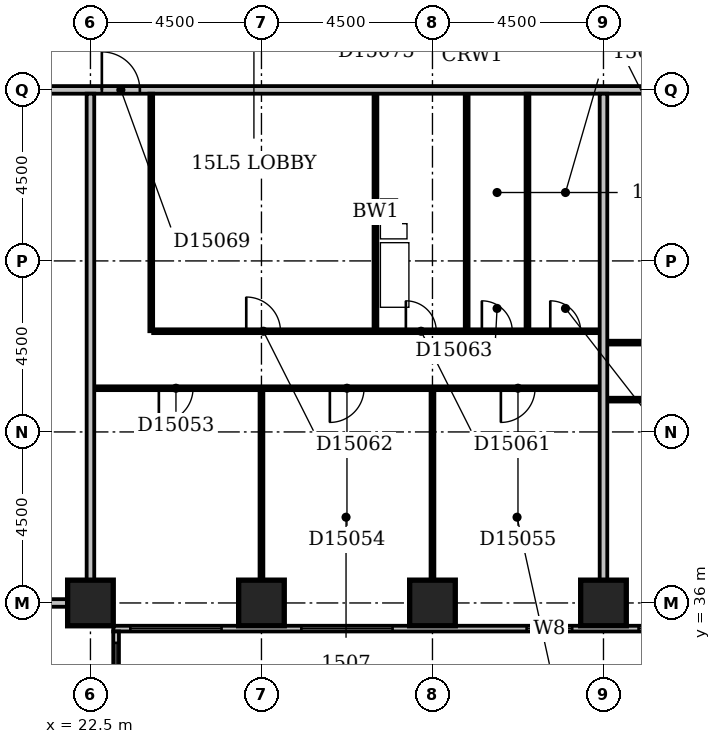
"""IFC4 building model, lengths in metres.
Left out: names, types, materials, properties, quantities, classifications, styles, units other than length and angle.
Written with IfcOpenShell. Run it as: python <this file> out.ifc"""

import sys

from ifc_helpers import new_model, si_unit, direction, frame, frame_2d, origin, origin_2d, place, context, subcontext, project, spatial, rectangle, extrude, element, fill, save


model = new_model("IFC4")
c1 = context("Model", 3, precision=1e-05, world=origin(), true_north=direction((0.0, 1.0)))
c2 = subcontext(c1, "Body", "Model", "MODEL_VIEW")
j1 = project(units=[si_unit("LENGTHUNIT", "METRE"), si_unit("PLANEANGLEUNIT", "RADIAN")], contexts=[c1])
p1 = place(None, origin())
s1 = spatial("IfcSite", under=j1, at=p1, CompositionType="ELEMENT")
p2 = place(p1, origin())
s2 = spatial("IfcBuilding", under=s1, at=p2, CompositionType="ELEMENT")
p3 = place(p2, frame((0.0, 0.0, 65.0)))
s3 = spatial("IfcBuildingStorey", under=s2, at=p3, CompositionType="ELEMENT", Elevation=65.0)
for number, where, z_axis, x_axis in (
    (1, (22.5, 36.0, -0.3), (0.0, 0.0, 1.0), (1.0, 0.0, 0.0)),
    (2, (27.0, 36.0, -0.3), (0.0, 0.0, 1.0), (1.0, 0.0, 0.0)),
    (3, (31.5, 36.0, -0.3), (0.0, 0.0, 1.0), (1.0, 0.0, 0.0)),
    (4, (36.0, 36.0, -0.3), (0.0, 0.0, 1.0), (1.0, 0.0, 0.0)),
):
    element("IfcColumn", number, at=place(p3, frame(where, z_axis=z_axis, x_axis=x_axis)), inside=s3, PredefinedType="COLUMN", context=c2, shape_type="SweptSolid", body=[
        extrude(rectangle(XDim=1.2, YDim=1.2, at=origin_2d()), origin(), (0.0, 0.0, 1.0), 3.6),
    ])
p4 = place(p3, frame((23.175, 17.4, 0.0), z_axis=(0.0, 0.0, 1.0), x_axis=(0.0, 1.0, 0.0)))
e5 = element("IfcWall", 5, at=p4, inside=s3, PredefinedType="STANDARD", context=c2, shape_type="SweptSolid", body=[
    extrude(rectangle(XDim=17.85, YDim=0.15, at=frame_2d((8.925, 0.0))), origin(), (0.0, 0.0, 1.0), 2.7),
])
p5 = place(p4, frame((1.65, 0.0, 0.6)))
e6 = element("IfcOpeningElement", 6, at=p5, cuts=e5, PredefinedType="OPENING", context=c2, shape_type="SweptSolid", body=[
    extrude(rectangle(XDim=2.4, YDim=1.8, at=frame_2d((1.2, 0.9))), frame((0.0, 0.087, 0.0), z_axis=(0.0, -1.0, 0.0), x_axis=(1.0, 0.0, 0.0)), (0.0, 0.0, 1.0), 0.174),
])
p6 = place(p4, frame((6.15, 0.0, 0.6)))
e7 = element("IfcOpeningElement", 7, at=p6, cuts=e5, PredefinedType="OPENING", context=c2, shape_type="SweptSolid", body=[
    extrude(rectangle(XDim=2.4, YDim=1.8, at=frame_2d((1.2, 0.9))), frame((0.0, 0.087, 0.0), z_axis=(0.0, -1.0, 0.0), x_axis=(1.0, 0.0, 0.0)), (0.0, 0.0, 1.0), 0.174),
])
p7 = place(p4, frame((10.479, 0.0, 0.6)))
e8 = element("IfcOpeningElement", 8, at=p7, cuts=e5, PredefinedType="OPENING", context=c2, shape_type="SweptSolid", body=[
    extrude(rectangle(XDim=1.8, YDim=1.8, at=frame_2d((0.9, 0.9))), frame((0.0, 0.087, 0.0), z_axis=(0.0, -1.0, 0.0), x_axis=(1.0, 0.0, 0.0)), (0.0, 0.0, 1.0), 0.174),
])
p8 = place(p4, frame((15.15, 0.0, 0.6)))
e9 = element("IfcOpeningElement", 9, at=p8, cuts=e5, PredefinedType="OPENING", context=c2, shape_type="SweptSolid", body=[
    extrude(rectangle(XDim=2.4, YDim=1.8, at=frame_2d((1.2, 0.9))), frame((0.0, 0.087, 0.0), z_axis=(0.0, -1.0, 0.0), x_axis=(1.0, 0.0, 0.0)), (0.0, 0.0, 1.0), 0.174),
])
p9 = place(p3, frame((23.1, 35.325, 0.0), z_axis=(0.0, 0.0, 1.0), x_axis=(1.0, 0.0, 0.0)))
e10 = element("IfcWall", 10, at=p9, inside=s3, PredefinedType="STANDARD", context=c2, shape_type="SweptSolid", body=[
    extrude(rectangle(XDim=45.15, YDim=0.15, at=frame_2d((22.575, 0.0))), origin(), (0.0, 0.0, 1.0), 2.7),
])
p10 = place(p9, frame((0.45, 0.0, 0.6)))
e11 = element("IfcOpeningElement", 11, at=p10, cuts=e10, PredefinedType="OPENING", context=c2, shape_type="SweptSolid", body=[
    extrude(rectangle(XDim=2.4, YDim=1.8, at=frame_2d((1.2, 0.9))), frame((0.0, 0.087, 0.0), z_axis=(0.0, -1.0, 0.0), x_axis=(1.0, 0.0, 0.0)), (0.0, 0.0, 1.0), 0.174),
])
p11 = place(p9, frame((4.95, 0.0, 0.6)))
e12 = element("IfcOpeningElement", 12, at=p11, cuts=e10, PredefinedType="OPENING", context=c2, shape_type="SweptSolid", body=[
    extrude(rectangle(XDim=2.4, YDim=1.8, at=frame_2d((1.2, 0.9))), frame((0.0, 0.087, 0.0), z_axis=(0.0, -1.0, 0.0), x_axis=(1.0, 0.0, 0.0)), (0.0, 0.0, 1.0), 0.174),
])
p12 = place(p9, frame((10.877, 0.0, 0.6)))
e13 = element("IfcOpeningElement", 13, at=p12, cuts=e10, PredefinedType="OPENING", context=c2, shape_type="SweptSolid", body=[
    extrude(rectangle(XDim=1.2, YDim=1.8, at=frame_2d((0.6, 0.9))), frame((0.0, 0.087, 0.0), z_axis=(0.0, -1.0, 0.0), x_axis=(1.0, 0.0, 0.0)), (0.0, 0.0, 1.0), 0.174),
])
p13 = place(p9, frame((13.823, 0.0, 0.6)))
e14 = element("IfcOpeningElement", 14, at=p13, cuts=e10, PredefinedType="OPENING", context=c2, shape_type="SweptSolid", body=[
    extrude(rectangle(XDim=1.2, YDim=1.8, at=frame_2d((0.6, 0.9))), frame((0.0, 0.087, 0.0), z_axis=(0.0, -1.0, 0.0), x_axis=(1.0, 0.0, 0.0)), (0.0, 0.0, 1.0), 0.174),
])
p14 = place(p9, frame((18.45, 0.0, 0.6)))
e15 = element("IfcOpeningElement", 15, at=p14, cuts=e10, PredefinedType="OPENING", context=c2, shape_type="SweptSolid", body=[
    extrude(rectangle(XDim=2.4, YDim=1.8, at=frame_2d((1.2, 0.9))), frame((0.0, 0.087, 0.0), z_axis=(0.0, -1.0, 0.0), x_axis=(1.0, 0.0, 0.0)), (0.0, 0.0, 1.0), 0.174),
])
p15 = place(p9, frame((22.95, 0.0, 0.6)))
e16 = element("IfcOpeningElement", 16, at=p15, cuts=e10, PredefinedType="OPENING", context=c2, shape_type="SweptSolid", body=[
    extrude(rectangle(XDim=2.4, YDim=1.8, at=frame_2d((1.2, 0.9))), frame((0.0, 0.087, 0.0), z_axis=(0.0, -1.0, 0.0), x_axis=(1.0, 0.0, 0.0)), (0.0, 0.0, 1.0), 0.174),
])
p16 = place(p9, frame((27.45, 0.0, 0.6)))
e17 = element("IfcOpeningElement", 17, at=p16, cuts=e10, PredefinedType="OPENING", context=c2, shape_type="SweptSolid", body=[
    extrude(rectangle(XDim=2.4, YDim=1.8, at=frame_2d((1.2, 0.9))), frame((0.0, 0.087, 0.0), z_axis=(0.0, -1.0, 0.0), x_axis=(1.0, 0.0, 0.0)), (0.0, 0.0, 1.0), 0.174),
])
p17 = place(p9, frame((31.95, 0.0, 0.6)))
e18 = element("IfcOpeningElement", 18, at=p17, cuts=e10, PredefinedType="OPENING", context=c2, shape_type="SweptSolid", body=[
    extrude(rectangle(XDim=2.4, YDim=1.8, at=frame_2d((1.2, 0.9))), frame((0.0, 0.087, 0.0), z_axis=(0.0, -1.0, 0.0), x_axis=(1.0, 0.0, 0.0)), (0.0, 0.0, 1.0), 0.174),
])
p18 = place(p9, frame((36.45, 0.0, 0.6)))
e19 = element("IfcOpeningElement", 19, at=p18, cuts=e10, PredefinedType="OPENING", context=c2, shape_type="SweptSolid", body=[
    extrude(rectangle(XDim=2.4, YDim=1.8, at=frame_2d((1.2, 0.9))), frame((0.0, 0.087, 0.0), z_axis=(0.0, -1.0, 0.0), x_axis=(1.0, 0.0, 0.0)), (0.0, 0.0, 1.0), 0.174),
])
p19 = place(p9, frame((41.403, 0.0, 0.6)))
e20 = element("IfcOpeningElement", 20, at=p19, cuts=e10, PredefinedType="OPENING", context=c2, shape_type="SweptSolid", body=[
    extrude(rectangle(XDim=2.1, YDim=1.8, at=frame_2d((1.05, 0.9))), frame((0.0, 0.087, 0.0), z_axis=(0.0, -1.0, 0.0), x_axis=(1.0, 0.0, 0.0)), (0.0, 0.0, 1.0), 0.174),
])
p20 = place(p3, frame((9.1, 36.0, 0.0), z_axis=(0.0, 0.0, 1.0), x_axis=(1.0, 0.0, 0.0)))
e21 = element("IfcWall", 21, at=p20, inside=s3, PredefinedType="PARTITIONING", context=c2, shape_type="SweptSolid", body=[
    extrude(rectangle(XDim=12.8, YDim=0.2, at=frame_2d((6.4, 0.0))), origin(), (0.0, 0.0, 1.0), 2.4),
])
p21 = place(p3, frame((22.5, 36.6, 0.0), z_axis=(0.0, 0.0, 1.0), x_axis=(0.0, 1.0, 0.0)))
e22 = element("IfcWall", 22, at=p21, inside=s3, PredefinedType="PARTITIONING", context=c2, shape_type="SweptSolid", body=[
    extrude(rectangle(XDim=12.8, YDim=0.2, at=frame_2d((6.4, 0.0))), origin(), (0.0, 0.0, 1.0), 3.3),
])
p22 = place(p3, frame((27.0, 36.6, 0.0), z_axis=(0.0, 0.0, 1.0), x_axis=(0.0, 1.0, 0.0)))
e23 = element("IfcWall", 23, at=p22, inside=s3, PredefinedType="PARTITIONING", context=c2, shape_type="SweptSolid", body=[
    extrude(rectangle(XDim=5.0, YDim=0.1, at=frame_2d((2.5, 0.0))), origin(), (0.0, 0.0, 1.0), 2.6),
])
p23 = place(p3, frame((31.5, 36.6, 0.0), z_axis=(0.0, 0.0, 1.0), x_axis=(0.0, 1.0, 0.0)))
e24 = element("IfcWall", 24, at=p23, inside=s3, PredefinedType="PARTITIONING", context=c2, shape_type="SweptSolid", body=[
    extrude(rectangle(XDim=5.0, YDim=0.1, at=frame_2d((2.5, 0.0))), origin(), (0.0, 0.0, 1.0), 3.3),
])
p24 = place(p3, frame((36.0, 36.6, 0.0), z_axis=(0.0, 0.0, 1.0), x_axis=(0.0, 1.0, 0.0)))
e25 = element("IfcWall", 25, at=p24, inside=s3, PredefinedType="PARTITIONING", context=c2, shape_type="SweptSolid", body=[
    extrude(rectangle(XDim=12.8, YDim=0.2, at=frame_2d((6.4, 0.0))), origin(), (0.0, 0.0, 1.0), 2.4),
])
p25 = place(p3, frame((36.1, 41.35, 0.0), z_axis=(0.0, 0.0, 1.0), x_axis=(1.0, 0.0, 0.0)))
e26 = element("IfcWall", 26, at=p25, inside=s3, PredefinedType="PARTITIONING", context=c2, shape_type="SweptSolid", body=[
    extrude(rectangle(XDim=8.8, YDim=0.1, at=frame_2d((4.4, 0.0))), origin(), (0.0, 0.0, 1.0), 3.3),
])
p26 = place(p25, frame((1.7, 0.0, 0.0)))
e27 = element("IfcOpeningElement", 27, at=p26, cuts=e26, PredefinedType="OPENING", context=c2, shape_type="SweptSolid", body=[
    extrude(rectangle(XDim=0.9, YDim=2.1, at=frame_2d((0.45, 1.05))), frame((0.0, 0.062, 0.0), z_axis=(0.0, -1.0, 0.0), x_axis=(1.0, 0.0, 0.0)), (0.0, 0.0, 1.0), 0.124),
])
p27 = place(p25, frame((5.05, 0.0, 0.0)))
e28 = element("IfcOpeningElement", 28, at=p27, cuts=e26, PredefinedType="OPENING", context=c2, shape_type="SweptSolid", body=[
    extrude(rectangle(XDim=0.9, YDim=2.1, at=frame_2d((0.45, 1.05))), frame((0.0, 0.062, 0.0), z_axis=(0.0, -1.0, 0.0), x_axis=(1.0, 0.0, 0.0)), (0.0, 0.0, 1.0), 0.124),
])
p28 = place(p3, frame((22.6, 41.65, 0.0), z_axis=(0.0, 0.0, 1.0), x_axis=(1.0, 0.0, 0.0)))
e29 = element("IfcWall", 29, at=p28, inside=s3, PredefinedType="PARTITIONING", context=c2, shape_type="SweptSolid", body=[
    extrude(rectangle(XDim=13.3, YDim=0.1, at=frame_2d((6.65, 0.0))), origin(), (0.0, 0.0, 1.0), 3.3),
])
p29 = place(p28, frame((1.7, 0.0, 0.0)))
e30 = element("IfcOpeningElement", 30, at=p29, cuts=e29, PredefinedType="OPENING", context=c2, shape_type="SweptSolid", body=[
    extrude(rectangle(XDim=0.9, YDim=2.1, at=frame_2d((0.45, 1.05))), frame((0.0, 0.062, 0.0), z_axis=(0.0, -1.0, 0.0), x_axis=(1.0, 0.0, 0.0)), (0.0, 0.0, 1.0), 0.124),
])
p30 = place(p28, frame((6.2, 0.0, 0.0)))
e31 = element("IfcOpeningElement", 31, at=p30, cuts=e29, PredefinedType="OPENING", context=c2, shape_type="SweptSolid", body=[
    extrude(rectangle(XDim=0.9, YDim=2.1, at=frame_2d((0.45, 1.05))), frame((0.0, 0.062, 0.0), z_axis=(0.0, -1.0, 0.0), x_axis=(1.0, 0.0, 0.0)), (0.0, 0.0, 1.0), 0.124),
])
p31 = place(p28, frame((10.7, 0.0, 0.0)))
e32 = element("IfcOpeningElement", 32, at=p31, cuts=e29, PredefinedType="OPENING", context=c2, shape_type="SweptSolid", body=[
    extrude(rectangle(XDim=0.9, YDim=2.1, at=frame_2d((0.45, 1.05))), frame((0.0, 0.062, 0.0), z_axis=(0.0, -1.0, 0.0), x_axis=(1.0, 0.0, 0.0)), (0.0, 0.0, 1.0), 0.124),
])
p32 = place(p3, frame((36.1, 42.85, 0.0), z_axis=(0.0, 0.0, 1.0), x_axis=(1.0, 0.0, 0.0)))
e33 = element("IfcWall", 33, at=p32, inside=s3, PredefinedType="PARTITIONING", context=c2, shape_type="SweptSolid", body=[
    extrude(rectangle(XDim=4.85, YDim=0.1, at=frame_2d((2.425, 0.0))), origin(), (0.0, 0.0, 1.0), 3.3),
])
p33 = place(p32, frame((1.95, 0.0, 0.0)))
e34 = element("IfcOpeningElement", 34, at=p33, cuts=e33, PredefinedType="OPENING", context=c2, shape_type="SweptSolid", body=[
    extrude(rectangle(XDim=0.9, YDim=2.1, at=frame_2d((0.45, 1.05))), frame((0.0, 0.062, 0.0), z_axis=(0.0, -1.0, 0.0), x_axis=(1.0, 0.0, 0.0)), (0.0, 0.0, 1.0), 0.124),
])
p34 = place(p3, frame((24.1, 43.15, 0.0), z_axis=(0.0, 0.0, 1.0), x_axis=(0.0, 1.0, 0.0)))
e35 = element("IfcWall", 35, at=p34, inside=s3, PredefinedType="PARTITIONING", context=c2, shape_type="SweptSolid", body=[
    extrude(rectangle(XDim=6.25, YDim=0.1, at=frame_2d((3.125, 0.0))), origin(), (0.0, 0.0, 1.0), 3.3),
])
p35 = place(p3, frame((24.15, 43.15, 0.0), z_axis=(0.0, 0.0, 1.0), x_axis=(1.0, 0.0, 0.0)))
e36 = element("IfcWall", 36, at=p35, inside=s3, PredefinedType="PARTITIONING", context=c2, shape_type="SweptSolid", body=[
    extrude(rectangle(XDim=11.75, YDim=0.1, at=frame_2d((5.875, 0.0))), origin(), (0.0, 0.0, 1.0), 3.3),
])
p36 = place(p35, frame((6.65, 0.0, 0.0)))
e37 = element("IfcOpeningElement", 37, at=p36, cuts=e36, PredefinedType="OPENING", context=c2, shape_type="SweptSolid", body=[
    extrude(rectangle(XDim=0.8, YDim=2.1, at=frame_2d((0.4, 1.05))), frame((0.0, 0.062, 0.0), z_axis=(0.0, -1.0, 0.0), x_axis=(1.0, 0.0, 0.0)), (0.0, 0.0, 1.0), 0.124),
])
p37 = place(p35, frame((2.45, 0.0, 0.0)))
e38 = element("IfcOpeningElement", 38, at=p37, cuts=e36, PredefinedType="OPENING", context=c2, shape_type="SweptSolid", body=[
    extrude(rectangle(XDim=0.9, YDim=2.1, at=frame_2d((0.45, 1.05))), frame((0.0, 0.062, 0.0), z_axis=(0.0, -1.0, 0.0), x_axis=(1.0, 0.0, 0.0)), (0.0, 0.0, 1.0), 0.124),
])
p38 = place(p35, frame((8.65, 0.0, 0.0)))
e39 = element("IfcOpeningElement", 39, at=p38, cuts=e36, PredefinedType="OPENING", context=c2, shape_type="SweptSolid", body=[
    extrude(rectangle(XDim=0.8, YDim=2.1, at=frame_2d((0.4, 1.05))), frame((0.0, 0.062, 0.0), z_axis=(0.0, -1.0, 0.0), x_axis=(1.0, 0.0, 0.0)), (0.0, 0.0, 1.0), 0.124),
])
p39 = place(p35, frame((10.45, 0.0, 0.0)))
e40 = element("IfcOpeningElement", 40, at=p39, cuts=e36, PredefinedType="OPENING", context=c2, shape_type="SweptSolid", body=[
    extrude(rectangle(XDim=0.8, YDim=2.1, at=frame_2d((0.4, 1.05))), frame((0.0, 0.062, 0.0), z_axis=(0.0, -1.0, 0.0), x_axis=(1.0, 0.0, 0.0)), (0.0, 0.0, 1.0), 0.124),
])
for number, where, z_axis, x_axis in (
    (41, (30.0, 43.2, 0.0), (0.0, 0.0, 1.0), (0.0, 1.0, 0.0)),
    (42, (32.4, 43.2, 0.0), (0.0, 0.0, 1.0), (0.0, 1.0, 0.0)),
):
    element("IfcWall", number, at=place(p3, frame(where, z_axis=z_axis, x_axis=x_axis)), inside=s3, PredefinedType="PLUMBINGWALL", context=c2, shape_type="SweptSolid", body=[
        extrude(rectangle(XDim=6.2, YDim=0.1, at=frame_2d((3.1, 0.0))), origin(), (0.0, 0.0, 1.0), 3.3),
    ])
p40 = place(p3, frame((34.0, 43.2, 0.0), z_axis=(0.0, 0.0, 1.0), x_axis=(0.0, 1.0, 0.0)))
e43 = element("IfcWall", 43, at=p40, inside=s3, PredefinedType="PARTITIONING", context=c2, shape_type="SweptSolid", body=[
    extrude(rectangle(XDim=6.2, YDim=0.1, at=frame_2d((3.1, 0.0))), origin(), (0.0, 0.0, 1.0), 3.3),
])
p41 = place(p3, frame((9.1, 49.5, 0.0), z_axis=(0.0, 0.0, 1.0), x_axis=(1.0, 0.0, 0.0)))
e44 = element("IfcWall", 44, at=p41, inside=s3, PredefinedType="PARTITIONING", context=c2, shape_type="SweptSolid", body=[
    extrude(rectangle(XDim=57.8, YDim=0.2, at=frame_2d((28.9, 0.0))), origin(), (0.0, 0.0, 1.0), 3.3),
])
p42 = place(p41, frame((13.7, 0.0, 0.0)))
e45 = element("IfcOpeningElement", 45, at=p42, cuts=e44, PredefinedType="OPENING", context=c2, shape_type="SweptSolid", body=[
    extrude(rectangle(XDim=1.0, YDim=2.1, at=frame_2d((0.5, 1.05))), frame((0.0, 0.112, 0.0), z_axis=(0.0, -1.0, 0.0), x_axis=(1.0, 0.0, 0.0)), (0.0, 0.0, 1.0), 0.224),
])
p43 = place(p41, frame((32.2, 0.0, 0.0)))
e46 = element("IfcOpeningElement", 46, at=p43, cuts=e44, PredefinedType="OPENING", context=c2, shape_type="SweptSolid", body=[
    extrude(rectangle(XDim=1.0, YDim=2.1, at=frame_2d((0.5, 1.05))), frame((0.0, 0.112, 0.0), z_axis=(0.0, -1.0, 0.0), x_axis=(1.0, 0.0, 0.0)), (0.0, 0.0, 1.0), 0.224),
])
p44 = place(p41, frame((37.85, 0.0, 0.0)))
e47 = element("IfcOpeningElement", 47, at=p44, cuts=e44, PredefinedType="OPENING", context=c2, shape_type="SweptSolid", body=[
    extrude(rectangle(XDim=1.0, YDim=2.1, at=frame_2d((0.5, 1.05))), frame((0.0, 0.112, 0.0), z_axis=(0.0, -1.0, 0.0), x_axis=(1.0, 0.0, 0.0)), (0.0, 0.0, 1.0), 0.224),
])
p45 = place(p41, frame((45.7, 0.0, 0.0)))
e48 = element("IfcOpeningElement", 48, at=p45, cuts=e44, PredefinedType="OPENING", context=c2, shape_type="SweptSolid", body=[
    extrude(rectangle(XDim=1.0, YDim=2.1, at=frame_2d((0.5, 1.05))), frame((0.0, 0.112, 0.0), z_axis=(0.0, -1.0, 0.0), x_axis=(1.0, 0.0, 0.0)), (0.0, 0.0, 1.0), 0.224),
])
p46 = place(p41, frame((49.7, 0.0, 0.0)))
e49 = element("IfcOpeningElement", 49, at=p46, cuts=e44, PredefinedType="OPENING", context=c2, shape_type="SweptSolid", body=[
    extrude(rectangle(XDim=1.0, YDim=2.1, at=frame_2d((0.5, 1.05))), frame((0.0, 0.112, 0.0), z_axis=(0.0, -1.0, 0.0), x_axis=(1.0, 0.0, 0.0)), (0.0, 0.0, 1.0), 0.224),
])
p47 = place(p41, frame((8.4, 0.0, 0.0)))
e50 = element("IfcOpeningElement", 50, at=p47, cuts=e44, PredefinedType="OPENING", context=c2, shape_type="SweptSolid", body=[
    extrude(rectangle(XDim=0.9, YDim=2.1, at=frame_2d((0.45, 1.05))), frame((0.0, 0.112, 0.0), z_axis=(0.0, -1.0, 0.0), x_axis=(1.0, 0.0, 0.0)), (0.0, 0.0, 1.0), 0.224),
])
p48 = place(p8, origin())
e51 = element("IfcWindow", 51, at=p48, inside=s3, PartitioningType="SINGLE_PANEL", PredefinedType="WINDOW", context=c2, shape_type="SweptSolid", body=[
    extrude(rectangle(XDim=2.4, YDim=1.8, at=frame_2d((1.2, 0.9))), frame((0.0, 0.03, 0.0), z_axis=(0.0, -1.0, 0.0), x_axis=(1.0, 0.0, 0.0)), (0.0, 0.0, 1.0), 0.06),
])
fill(e9, e51)
p49 = place(p10, origin())
e52 = element("IfcWindow", 52, at=p49, inside=s3, PartitioningType="SINGLE_PANEL", PredefinedType="WINDOW", context=c2, shape_type="SweptSolid", body=[
    extrude(rectangle(XDim=2.4, YDim=1.8, at=frame_2d((1.2, 0.9))), frame((0.0, 0.03, 0.0), z_axis=(0.0, -1.0, 0.0), x_axis=(1.0, 0.0, 0.0)), (0.0, 0.0, 1.0), 0.06),
])
fill(e11, e52)
p50 = place(p11, origin())
e53 = element("IfcWindow", 53, at=p50, inside=s3, PartitioningType="SINGLE_PANEL", PredefinedType="WINDOW", context=c2, shape_type="SweptSolid", body=[
    extrude(rectangle(XDim=2.4, YDim=1.8, at=frame_2d((1.2, 0.9))), frame((0.0, 0.03, 0.0), z_axis=(0.0, -1.0, 0.0), x_axis=(1.0, 0.0, 0.0)), (0.0, 0.0, 1.0), 0.06),
])
fill(e12, e53)
p51 = place(p12, origin())
e54 = element("IfcWindow", 54, at=p51, inside=s3, PartitioningType="SINGLE_PANEL", PredefinedType="WINDOW", context=c2, shape_type="SweptSolid", body=[
    extrude(rectangle(XDim=1.2, YDim=1.8, at=frame_2d((0.6, 0.9))), frame((0.0, 0.03, 0.0), z_axis=(0.0, -1.0, 0.0), x_axis=(1.0, 0.0, 0.0)), (0.0, 0.0, 1.0), 0.06),
])
fill(e13, e54)
p52 = place(p13, origin())
e55 = element("IfcWindow", 55, at=p52, inside=s3, PartitioningType="SINGLE_PANEL", PredefinedType="WINDOW", context=c2, shape_type="SweptSolid", body=[
    extrude(rectangle(XDim=1.2, YDim=1.8, at=frame_2d((0.6, 0.9))), frame((0.0, 0.03, 0.0), z_axis=(0.0, -1.0, 0.0), x_axis=(1.0, 0.0, 0.0)), (0.0, 0.0, 1.0), 0.06),
])
fill(e14, e55)
p53 = place(p29, frame((0.9, 0.0, 0.0), z_axis=(0.0, 0.0, 1.0), x_axis=(-1.0, 0.0, 0.0)))
e56 = element("IfcDoor", 56, at=p53, inside=s3, OperationType="SINGLE_SWING_RIGHT", PredefinedType="DOOR", context=c2, shape_type="SweptSolid", body=[
    extrude(rectangle(XDim=0.9, YDim=2.1, at=frame_2d((0.45, 1.05))), frame((0.0, 0.025, 0.0), z_axis=(0.0, -1.0, 0.0), x_axis=(1.0, 0.0, 0.0)), (0.0, 0.0, 1.0), 0.05),
])
fill(e30, e56)
p54 = place(p30, frame((0.9, 0.0, 0.0), z_axis=(0.0, 0.0, 1.0), x_axis=(-1.0, 0.0, 0.0)))
e57 = element("IfcDoor", 57, at=p54, inside=s3, OperationType="SINGLE_SWING_RIGHT", PredefinedType="DOOR", context=c2, shape_type="SweptSolid", body=[
    extrude(rectangle(XDim=0.9, YDim=2.1, at=frame_2d((0.45, 1.05))), frame((0.0, 0.025, 0.0), z_axis=(0.0, -1.0, 0.0), x_axis=(1.0, 0.0, 0.0)), (0.0, 0.0, 1.0), 0.05),
])
fill(e31, e57)
p55 = place(p31, frame((0.9, 0.0, 0.0), z_axis=(0.0, 0.0, 1.0), x_axis=(-1.0, 0.0, 0.0)))
e58 = element("IfcDoor", 58, at=p55, inside=s3, OperationType="SINGLE_SWING_RIGHT", PredefinedType="DOOR", context=c2, shape_type="SweptSolid", body=[
    extrude(rectangle(XDim=0.9, YDim=2.1, at=frame_2d((0.45, 1.05))), frame((0.0, 0.025, 0.0), z_axis=(0.0, -1.0, 0.0), x_axis=(1.0, 0.0, 0.0)), (0.0, 0.0, 1.0), 0.05),
])
fill(e32, e58)
p56 = place(p36, origin())
e59 = element("IfcDoor", 59, at=p56, inside=s3, OperationType="SINGLE_SWING_LEFT", PredefinedType="DOOR", context=c2, shape_type="SweptSolid", body=[
    extrude(rectangle(XDim=0.8, YDim=2.1, at=frame_2d((0.4, 1.05))), frame((0.0, 0.025, 0.0), z_axis=(0.0, -1.0, 0.0), x_axis=(1.0, 0.0, 0.0)), (0.0, 0.0, 1.0), 0.05),
])
fill(e37, e59)
p57 = place(p37, origin())
e60 = element("IfcDoor", 60, at=p57, inside=s3, OperationType="SINGLE_SWING_LEFT", PredefinedType="DOOR", context=c2, shape_type="SweptSolid", body=[
    extrude(rectangle(XDim=0.9, YDim=2.1, at=frame_2d((0.45, 1.05))), frame((0.0, 0.025, 0.0), z_axis=(0.0, -1.0, 0.0), x_axis=(1.0, 0.0, 0.0)), (0.0, 0.0, 1.0), 0.05),
])
fill(e38, e60)
p58 = place(p38, origin())
e61 = element("IfcDoor", 61, at=p58, inside=s3, OperationType="SINGLE_SWING_LEFT", PredefinedType="DOOR", context=c2, shape_type="SweptSolid", body=[
    extrude(rectangle(XDim=0.8, YDim=2.1, at=frame_2d((0.4, 1.05))), frame((0.0, 0.025, 0.0), z_axis=(0.0, -1.0, 0.0), x_axis=(1.0, 0.0, 0.0)), (0.0, 0.0, 1.0), 0.05),
])
fill(e39, e61)
p59 = place(p39, origin())
e62 = element("IfcDoor", 62, at=p59, inside=s3, OperationType="SINGLE_SWING_LEFT", PredefinedType="DOOR", context=c2, shape_type="SweptSolid", body=[
    extrude(rectangle(XDim=0.8, YDim=2.1, at=frame_2d((0.4, 1.05))), frame((0.0, 0.025, 0.0), z_axis=(0.0, -1.0, 0.0), x_axis=(1.0, 0.0, 0.0)), (0.0, 0.0, 1.0), 0.05),
])
fill(e40, e62)
p60 = place(p42, origin())
e63 = element("IfcDoor", 63, at=p60, inside=s3, OperationType="SINGLE_SWING_LEFT", PredefinedType="DOOR", context=c2, shape_type="SweptSolid", body=[
    extrude(rectangle(XDim=1.0, YDim=2.1, at=frame_2d((0.5, 1.05))), frame((0.0, 0.025, 0.0), z_axis=(0.0, -1.0, 0.0), x_axis=(1.0, 0.0, 0.0)), (0.0, 0.0, 1.0), 0.05),
])
fill(e45, e63)
save(model, sys.argv[1])
